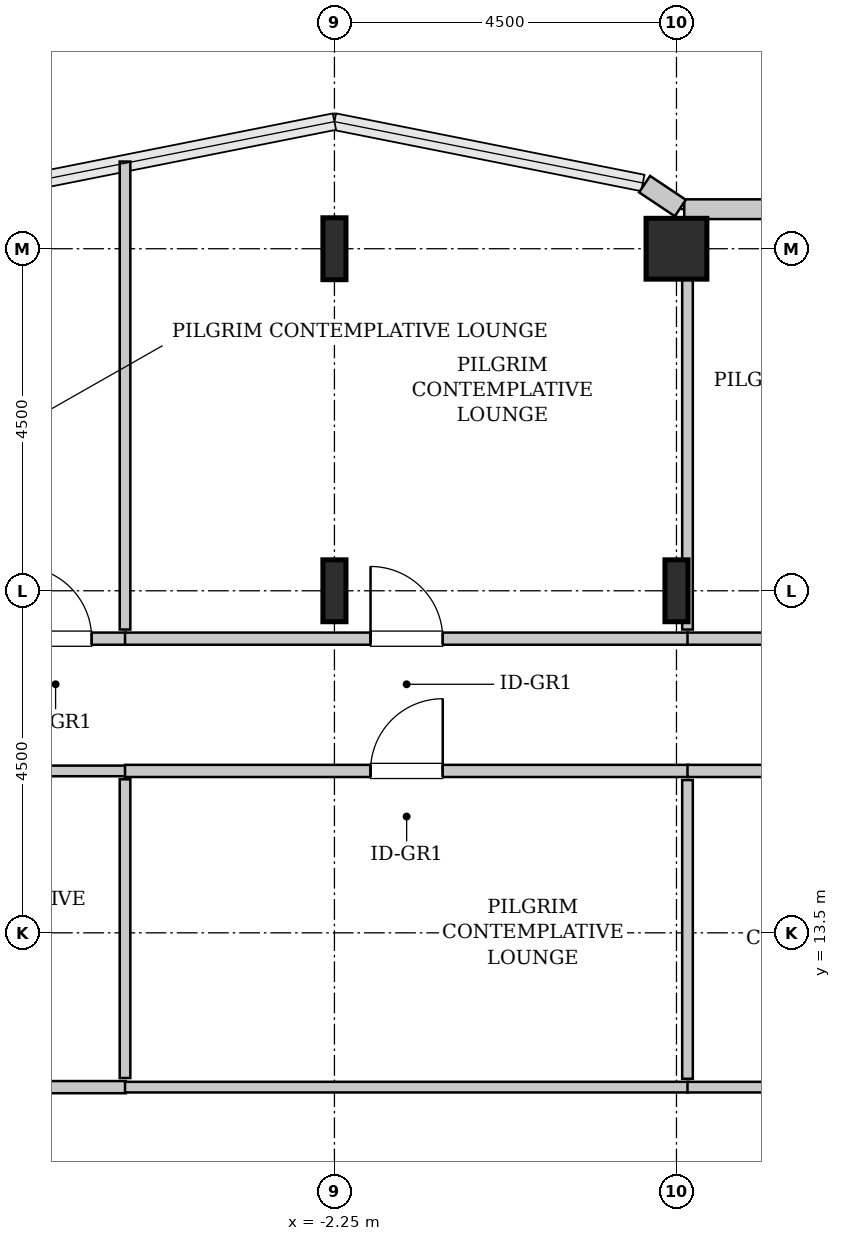
"""IFC4 building model, lengths in metres.
Left out: names, types, materials, properties, quantities, classifications, styles, units other than length and angle.
Written with IfcOpenShell. Run it as: python <this file> out.ifc"""

import sys

from ifc_helpers import new_model, si_unit, direction, frame, frame_2d, origin, origin_2d, place, context, subcontext, project, spatial, rectangle, hollow_rectangle, i_section, extrude, source, transform, mapped, element, fill, save


model = new_model("IFC4")
c1 = context("Model", 3, precision=1e-05, world=origin(), true_north=direction((0.0, 1.0)))
c2 = subcontext(c1, "Body", "Model", "MODEL_VIEW")
j1 = project(units=[si_unit("LENGTHUNIT", "METRE"), si_unit("PLANEANGLEUNIT", "RADIAN")], contexts=[c1])
p1 = place(None, origin())
s1 = spatial("IfcSite", under=j1, at=p1, CompositionType="ELEMENT")
p2 = place(p1, origin())
s2 = spatial("IfcBuilding", under=s1, at=p2, CompositionType="ELEMENT")
p3 = place(p2, frame((0.0, 0.0, 152.6)))
s3 = spatial("IfcBuildingStorey", under=s2, at=p3, CompositionType="ELEMENT", Elevation=152.6)
m1 = source(origin(), c2, "Body", "SweptSolid", [
    extrude(i_section(OverallWidth=0.303, OverallDepth=0.814, WebThickness=0.021, FlangeThickness=0.04, FilletRadius=0.03, at=origin_2d()), origin(), (0.0, 0.0, 1.0), 3.8),
])
for number, where, z_axis, x_axis in (
    (1, (-2.25, 18.0, 0.0), (0.0, 0.0, 1.0), (1.0, 0.0, 0.0)),
    (2, (-2.25, 22.5, 0.0), (0.0, 0.0, 1.0), (1.0, 0.0, 0.0)),
    (3, (2.25, 18.0, 0.0), (0.0, 0.0, 1.0), (1.0, 0.0, 0.0)),
):
    element("IfcColumn", number, at=place(p3, frame(where, z_axis=z_axis, x_axis=x_axis)), inside=s3, PredefinedType="COLUMN", context=c2, shape_type="MappedRepresentation", body=[
        mapped(m1, transform((0.0, 0.0, 0.0), x_axis=(1.0, 0.0, 0.0), y_axis=(0.0, 1.0, 0.0), z_axis=(0.0, 0.0, 1.0), scale=1.0)),
    ])
m2 = source(origin(), c2, "Body", "SweptSolid", [
    extrude(hollow_rectangle(XDim=0.8, YDim=0.8, WallThickness=0.04, InnerFilletRadius=0.04, OuterFilletRadius=0.08, at=origin_2d()), origin(), (0.0, 0.0, 1.0), 3.8),
])
p4 = place(p3, frame((2.25, 22.5, 0.0), z_axis=(0.0, 0.0, 1.0), x_axis=(1.0, 0.0, 0.0)))
e4 = element("IfcColumn", 4, at=p4, inside=s3, PredefinedType="COLUMN", context=c2, shape_type="MappedRepresentation", body=[
    mapped(m2, transform((0.0, 0.0, 0.0), x_axis=(1.0, 0.0, 0.0), y_axis=(0.0, 1.0, 0.0), z_axis=(0.0, 0.0, 1.0), scale=1.0)),
])
m3 = source(origin(), c2, "Body", "SweptSolid", [
    extrude(rectangle(XDim=1.37, YDim=0.26, at=frame_2d((0.685, 0.0))), origin(), (0.0, 0.0, 1.0), 3.55),
])
p5 = place(p3, frame((3.722, 23.02, 0.0), z_axis=(0.0, 0.0, 1.0), x_axis=(-1.0, 0.0, 0.0)))
e5 = element("IfcWall", 5, at=p5, inside=s3, PredefinedType="SOLIDWALL", context=c2, shape_type="MappedRepresentation", body=[
    mapped(m3, transform((0.0, 0.0, 0.0), x_axis=(1.0, 0.0, 0.0), y_axis=(0.0, 1.0, 0.0), z_axis=(0.0, 0.0, 1.0), scale=1.0)),
])
m4 = source(origin(), c2, "Body", "SweptSolid", [
    extrude(rectangle(XDim=0.565, YDim=0.26, at=frame_2d((0.283, 0.0))), origin(), (0.0, 0.0, 1.0), 3.55),
])
p6 = place(p3, frame((2.301, 23.036, 0.0), z_axis=(0.0, 0.0, 1.0), x_axis=(-0.831651492666, 0.555297933317, 0.0)))
e6 = element("IfcWall", 6, at=p6, inside=s3, PredefinedType="SOLIDWALL", context=c2, shape_type="MappedRepresentation", body=[
    mapped(m4, transform((0.0, 0.0, 0.0), x_axis=(1.0, 0.0, 0.0), y_axis=(0.0, 1.0, 0.0), z_axis=(0.0, 0.0, 1.0), scale=1.0)),
])
m5 = source(origin(), c2, "Body", "SweptSolid", [
    extrude(rectangle(XDim=7.015, YDim=0.16, at=frame_2d((3.507, 0.0))), origin(), (0.0, 0.0, 1.0), 3.535),
])
p7 = place(p3, frame((-12.01, 11.47, 0.0), z_axis=(0.0, 0.0, 1.0), x_axis=(1.0, 0.0, 0.0)))
e7 = element("IfcWall", 7, at=p7, inside=s3, PredefinedType="PARTITIONING", context=c2, shape_type="MappedRepresentation", body=[
    mapped(m5, transform((0.0, 0.0, 0.0), x_axis=(1.0, 0.0, 0.0), y_axis=(0.0, 1.0, 0.0), z_axis=(0.0, 0.0, 1.0), scale=1.0)),
])
p8 = place(p7, frame((3.032, 0.0, 0.0)))
e8 = element("IfcOpeningElement", 8, at=p8, cuts=e7, PredefinedType="OPENING", context=c2, shape_type="SweptSolid", body=[
    extrude(rectangle(XDim=0.95, YDim=2.1, at=frame_2d((0.475, 1.05))), frame((0.0, 0.09, 0.0), z_axis=(0.0, -1.0, 0.0), x_axis=(1.0, 0.0, 0.0)), (0.0, 0.0, 1.0), 0.18),
])
m6 = source(origin(), c2, "Body", "SweptSolid", [
    extrude(rectangle(XDim=7.015, YDim=0.14, at=frame_2d((3.507, 0.0))), origin(), (0.0, 0.0, 1.0), 3.535),
])
p9 = place(p3, frame((-12.01, 15.63, 0.0), z_axis=(0.0, 0.0, 1.0), x_axis=(1.0, 0.0, 0.0)))
e9 = element("IfcWall", 9, at=p9, inside=s3, PredefinedType="PARTITIONING", context=c2, shape_type="MappedRepresentation", body=[
    mapped(m6, transform((0.0, 0.0, 0.0), x_axis=(1.0, 0.0, 0.0), y_axis=(0.0, 1.0, 0.0), z_axis=(0.0, 0.0, 1.0), scale=1.0)),
])
m7 = source(origin(), c2, "Body", "SweptSolid", [
    extrude(rectangle(XDim=3.93, YDim=0.14, at=frame_2d((1.965, 0.0))), origin(), (0.0, 0.0, 1.0), 3.535),
])
p10 = place(p3, frame((-5.005, 11.59, 0.0), z_axis=(0.0, 0.0, 1.0), x_axis=(0.0, 1.0, 0.0)))
e10 = element("IfcWall", 10, at=p10, inside=s3, PredefinedType="PARTITIONING", context=c2, shape_type="MappedRepresentation", body=[
    mapped(m7, transform((0.0, 0.0, 0.0), x_axis=(1.0, 0.0, 0.0), y_axis=(0.0, 1.0, 0.0), z_axis=(0.0, 0.0, 1.0), scale=1.0)),
])
m8 = source(origin(), c2, "Body", "SweptSolid", [
    extrude(rectangle(XDim=2.445, YDim=0.16, at=frame_2d((1.222, 0.0))), origin(), (0.0, 0.0, 1.0), 3.535),
])
p11 = place(p3, frame((-7.44, 17.37, 0.0), z_axis=(0.0, 0.0, 1.0), x_axis=(1.0, 0.0, 0.0)))
e11 = element("IfcWall", 11, at=p11, inside=s3, PredefinedType="PARTITIONING", context=c2, shape_type="MappedRepresentation", body=[
    mapped(m8, transform((0.0, 0.0, 0.0), x_axis=(1.0, 0.0, 0.0), y_axis=(0.0, 1.0, 0.0), z_axis=(0.0, 0.0, 1.0), scale=1.0)),
])
p12 = place(p11, frame((1.047, 0.0, 0.0)))
e12 = element("IfcOpeningElement", 12, at=p12, cuts=e11, PredefinedType="OPENING", context=c2, shape_type="SweptSolid", body=[
    extrude(rectangle(XDim=0.95, YDim=2.1, at=frame_2d((0.475, 1.05))), frame((0.0, 0.09, 0.0), z_axis=(0.0, -1.0, 0.0), x_axis=(1.0, 0.0, 0.0)), (0.0, 0.0, 1.0), 0.18),
])
m9 = source(origin(), c2, "Body", "SweptSolid", [
    extrude(rectangle(XDim=6.157, YDim=0.14, at=frame_2d((3.078, 0.0))), origin(), (0.0, 0.0, 1.0), 3.535),
])
p13 = place(p3, frame((-5.005, 17.49, 0.0), z_axis=(0.0, 0.0, 1.0), x_axis=(0.0, 1.0, 0.0)))
e13 = element("IfcWall", 13, at=p13, inside=s3, PredefinedType="PARTITIONING", context=c2, shape_type="MappedRepresentation", body=[
    mapped(m9, transform((0.0, 0.0, 0.0), x_axis=(1.0, 0.0, 0.0), y_axis=(0.0, 1.0, 0.0), z_axis=(0.0, 0.0, 1.0), scale=1.0)),
])
m10 = source(origin(), c2, "Body", "SweptSolid", [
    extrude(rectangle(XDim=7.41, YDim=0.16, at=frame_2d((3.705, 0.0))), origin(), (0.0, 0.0, 1.0), 3.535),
])
p14 = place(p3, frame((-5.005, 17.37, 0.0), z_axis=(0.0, 0.0, 1.0), x_axis=(1.0, 0.0, 0.0)))
e14 = element("IfcWall", 14, at=p14, inside=s3, PredefinedType="PARTITIONING", context=c2, shape_type="MappedRepresentation", body=[
    mapped(m10, transform((0.0, 0.0, 0.0), x_axis=(1.0, 0.0, 0.0), y_axis=(0.0, 1.0, 0.0), z_axis=(0.0, 0.0, 1.0), scale=1.0)),
])
p15 = place(p14, frame((3.23, 0.0, 0.0)))
e15 = element("IfcOpeningElement", 15, at=p15, cuts=e14, PredefinedType="OPENING", context=c2, shape_type="SweptSolid", body=[
    extrude(rectangle(XDim=0.95, YDim=2.1, at=frame_2d((0.475, 1.05))), frame((0.0, 0.09, 0.0), z_axis=(0.0, -1.0, 0.0), x_axis=(1.0, 0.0, 0.0)), (0.0, 0.0, 1.0), 0.18),
])
m11 = source(origin(), c2, "Body", "SweptSolid", [
    extrude(rectangle(XDim=5.36, YDim=0.14, at=frame_2d((2.68, 0.0))), origin(), (0.0, 0.0, 1.0), 2.875),
])
p16 = place(p3, frame((2.395, 17.49, 0.0), z_axis=(0.0, 0.0, 1.0), x_axis=(0.0, 1.0, 0.0)))
e16 = element("IfcWall", 16, at=p16, inside=s3, PredefinedType="PARTITIONING", context=c2, shape_type="MappedRepresentation", body=[
    mapped(m11, transform((0.0, 0.0, 0.0), x_axis=(1.0, 0.0, 0.0), y_axis=(0.0, 1.0, 0.0), z_axis=(0.0, 0.0, 1.0), scale=1.0)),
])
p17 = place(p3, frame((-5.005, 15.63, 0.0), z_axis=(0.0, 0.0, 1.0), x_axis=(1.0, 0.0, 0.0)))
e17 = element("IfcWall", 17, at=p17, inside=s3, PredefinedType="PARTITIONING", context=c2, shape_type="MappedRepresentation", body=[
    mapped(m10, transform((0.0, 0.0, 0.0), x_axis=(1.0, 0.0, 0.0), y_axis=(0.0, 1.0, 0.0), z_axis=(0.0, 0.0, 1.0), scale=1.0)),
])
p18 = place(p17, frame((3.23, 0.0, 0.0)))
e18 = element("IfcOpeningElement", 18, at=p18, cuts=e17, PredefinedType="OPENING", context=c2, shape_type="SweptSolid", body=[
    extrude(rectangle(XDim=0.95, YDim=2.1, at=frame_2d((0.475, 1.05))), frame((0.0, 0.09, 0.0), z_axis=(0.0, -1.0, 0.0), x_axis=(1.0, 0.0, 0.0)), (0.0, 0.0, 1.0), 0.18),
])
m12 = source(origin(), c2, "Body", "SweptSolid", [
    extrude(rectangle(XDim=7.41, YDim=0.14, at=frame_2d((3.705, 0.0))), origin(), (0.0, 0.0, 1.0), 3.535),
])
p19 = place(p3, frame((-5.005, 11.47, 0.0), z_axis=(0.0, 0.0, 1.0), x_axis=(1.0, 0.0, 0.0)))
e19 = element("IfcWall", 19, at=p19, inside=s3, PredefinedType="PARTITIONING", context=c2, shape_type="MappedRepresentation", body=[
    mapped(m12, transform((0.0, 0.0, 0.0), x_axis=(1.0, 0.0, 0.0), y_axis=(0.0, 1.0, 0.0), z_axis=(0.0, 0.0, 1.0), scale=1.0)),
])
p20 = place(p3, frame((2.395, 11.58, 0.0), z_axis=(0.0, 0.0, 1.0), x_axis=(0.0, 1.0, 0.0)))
e20 = element("IfcWall", 20, at=p20, inside=s3, PredefinedType="PARTITIONING", context=c2, shape_type="MappedRepresentation", body=[
    mapped(m7, transform((0.0, 0.0, 0.0), x_axis=(1.0, 0.0, 0.0), y_axis=(0.0, 1.0, 0.0), z_axis=(0.0, 0.0, 1.0), scale=1.0)),
])
m13 = source(origin(), c2, "Body", "SweptSolid", [
    extrude(rectangle(XDim=5.81, YDim=0.16, at=frame_2d((2.905, 0.0))), origin(), (0.0, 0.0, 1.0), 3.535),
])
p21 = place(p3, frame((2.395, 17.37, 0.0), z_axis=(0.0, 0.0, 1.0), x_axis=(1.0, 0.0, 0.0)))
e21 = element("IfcWall", 21, at=p21, inside=s3, PredefinedType="PARTITIONING", context=c2, shape_type="MappedRepresentation", body=[
    mapped(m13, transform((0.0, 0.0, 0.0), x_axis=(1.0, 0.0, 0.0), y_axis=(0.0, 1.0, 0.0), z_axis=(0.0, 0.0, 1.0), scale=1.0)),
])
p22 = place(p21, frame((2.43, 0.0, 0.0)))
e22 = element("IfcOpeningElement", 22, at=p22, cuts=e21, PredefinedType="OPENING", context=c2, shape_type="SweptSolid", body=[
    extrude(rectangle(XDim=0.95, YDim=2.1, at=frame_2d((0.475, 1.05))), frame((0.0, 0.09, 0.0), z_axis=(0.0, -1.0, 0.0), x_axis=(1.0, 0.0, 0.0)), (0.0, 0.0, 1.0), 0.18),
])
p23 = place(p3, frame((2.395, 15.63, 0.0), z_axis=(0.0, 0.0, 1.0), x_axis=(1.0, 0.0, 0.0)))
e23 = element("IfcWall", 23, at=p23, inside=s3, PredefinedType="PARTITIONING", context=c2, shape_type="MappedRepresentation", body=[
    mapped(m13, transform((0.0, 0.0, 0.0), x_axis=(1.0, 0.0, 0.0), y_axis=(0.0, 1.0, 0.0), z_axis=(0.0, 0.0, 1.0), scale=1.0)),
])
p24 = place(p23, frame((2.43, 0.0, 0.0)))
e24 = element("IfcOpeningElement", 24, at=p24, cuts=e23, PredefinedType="OPENING", context=c2, shape_type="SweptSolid", body=[
    extrude(rectangle(XDim=0.95, YDim=2.1, at=frame_2d((0.475, 1.05))), frame((0.0, 0.09, 0.0), z_axis=(0.0, -1.0, 0.0), x_axis=(1.0, 0.0, 0.0)), (0.0, 0.0, 1.0), 0.18),
])
m14 = source(origin(), c2, "Body", "SweptSolid", [
    extrude(rectangle(XDim=5.81, YDim=0.14, at=frame_2d((2.905, 0.0))), origin(), (0.0, 0.0, 1.0), 3.535),
])
p25 = place(p3, frame((2.395, 11.47, 0.0), z_axis=(0.0, 0.0, 1.0), x_axis=(1.0, 0.0, 0.0)))
e25 = element("IfcWall", 25, at=p25, inside=s3, PredefinedType="PARTITIONING", context=c2, shape_type="MappedRepresentation", body=[
    mapped(m14, transform((0.0, 0.0, 0.0), x_axis=(1.0, 0.0, 0.0), y_axis=(0.0, 1.0, 0.0), z_axis=(0.0, 0.0, 1.0), scale=1.0)),
])
m15 = source(origin(), c2, "Body", "SweptSolid", [
    extrude(rectangle(XDim=0.95, YDim=2.1, at=frame_2d((0.475, 1.05))), frame((0.0, 0.025, 0.0), z_axis=(0.0, -1.0, 0.0), x_axis=(1.0, 0.0, 0.0)), (0.0, 0.0, 1.0), 0.05),
])
p26 = place(p12, origin())
e26 = element("IfcDoor", 26, at=p26, inside=s3, OperationType="SINGLE_SWING_LEFT", PredefinedType="DOOR", context=c2, shape_type="MappedRepresentation", body=[
    mapped(m15, transform((0.0, 0.0, 0.0), x_axis=(1.0, 0.0, 0.0), y_axis=(0.0, 1.0, 0.0), z_axis=(0.0, 0.0, 1.0), scale=1.0)),
])
fill(e12, e26)
p27 = place(p15, origin())
e27 = element("IfcDoor", 27, at=p27, inside=s3, OperationType="SINGLE_SWING_LEFT", PredefinedType="DOOR", context=c2, shape_type="MappedRepresentation", body=[
    mapped(m15, transform((0.0, 0.0, 0.0), x_axis=(1.0, 0.0, 0.0), y_axis=(0.0, 1.0, 0.0), z_axis=(0.0, 0.0, 1.0), scale=1.0)),
])
fill(e15, e27)
p28 = place(p18, origin())
e28 = element("IfcDoor", 28, at=p28, inside=s3, OperationType="SINGLE_SWING_RIGHT", PredefinedType="DOOR", context=c2, shape_type="MappedRepresentation", body=[
    mapped(m15, transform((0.0, 0.0, 0.0), x_axis=(1.0, 0.0, 0.0), y_axis=(0.0, 1.0, 0.0), z_axis=(0.0, 0.0, 1.0), scale=1.0)),
])
fill(e18, e28)
save(model, sys.argv[1])
